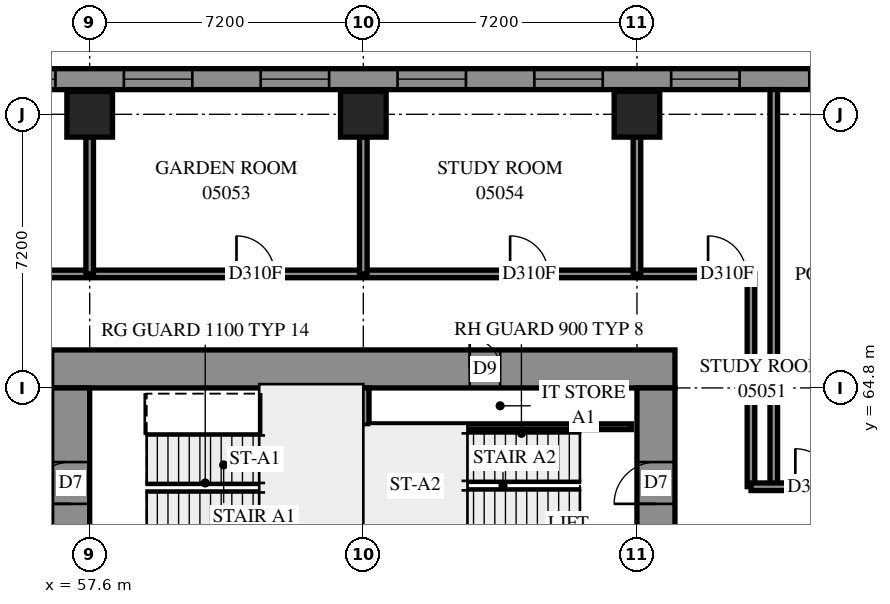
"""IFC4 building model, lengths in metres.
Left out: names, types, materials, properties, quantities, classifications, styles, units other than length and angle.
Written with IfcOpenShell. Run it as: python <this file> out.ifc"""

import sys

from ifc_helpers import new_model, si_unit, direction, frame, frame_2d, origin, origin_2d, place, context, subcontext, project, spatial, polyline, rectangle, outline, extrude, element, fill, save


model = new_model("IFC4")
c1 = context("Model", 3, precision=1e-05, world=origin(), true_north=direction((0.0, 1.0)))
c2 = subcontext(c1, "Body", "Model", "MODEL_VIEW")
j1 = project(units=[si_unit("LENGTHUNIT", "METRE"), si_unit("PLANEANGLEUNIT", "RADIAN")], contexts=[c1])
p1 = place(None, origin())
s1 = spatial("IfcSite", under=j1, at=p1, CompositionType="ELEMENT")
p2 = place(p1, origin())
s2 = spatial("IfcBuilding", under=s1, at=p2, CompositionType="ELEMENT")
p3 = place(p2, frame((0.0, 0.0, 22.8)))
s3 = spatial("IfcBuildingStorey", under=s2, at=p3, CompositionType="ELEMENT", Elevation=22.8)
for number, where, z_axis, x_axis in (
    (1, (57.6, 72.0, 0.0), (0.0, 0.0, 1.0), (1.0, 0.0, 0.0)),
    (2, (64.8, 72.0, 0.0), (0.0, 0.0, 1.0), (1.0, 0.0, 0.0)),
    (3, (72.0, 72.0, 0.0), (0.0, 0.0, 1.0), (1.0, 0.0, 0.0)),
):
    element("IfcColumn", number, at=place(p3, frame(where, z_axis=z_axis, x_axis=x_axis)), inside=s3, PredefinedType="COLUMN", context=c2, shape_type="SweptSolid", body=[
        extrude(rectangle(XDim=1.2, YDim=1.2, at=origin_2d()), origin(), (0.0, 0.0, 1.0), 3.9),
    ])
p4 = place(p3, frame((56.6, 65.3, -0.4), z_axis=(0.0, 0.0, 1.0), x_axis=(1.0, 0.0, 0.0)))
e4 = element("IfcWall", 4, at=p4, inside=s3, PredefinedType="SHEAR", context=c2, shape_type="SweptSolid", body=[
    extrude(rectangle(XDim=16.4, YDim=1.0, at=frame_2d((8.2, 0.0))), origin(), (0.0, 0.0, 1.0), 3.6),
])
p5 = place(p4, frame((11.0, 0.0, 0.4)))
e5 = element("IfcOpeningElement", 5, at=p5, cuts=e4, PredefinedType="OPENING", context=c2, shape_type="SweptSolid", body=[
    extrude(rectangle(XDim=0.8, YDim=2.1, at=frame_2d((0.4, 1.05))), frame((0.0, 0.51, 0.0), z_axis=(0.0, -1.0, 0.0), x_axis=(1.0, 0.0, 0.0)), (0.0, 0.0, 1.0), 1.02),
])
p6 = place(p3, frame((57.1, 50.4, -0.4), z_axis=(0.0, 0.0, 1.0), x_axis=(0.0, 1.0, 0.0)))
e6 = element("IfcWall", 6, at=p6, inside=s3, PredefinedType="SHEAR", context=c2, shape_type="SweptSolid", body=[
    extrude(rectangle(XDim=14.4, YDim=1.0, at=frame_2d((7.2, 0.0))), origin(), (0.0, 0.0, 1.0), 3.6),
])
p7 = place(p6, frame((4.55, 0.0, 0.4)))
e7 = element("IfcOpeningElement", 7, at=p7, cuts=e6, PredefinedType="OPENING", context=c2, shape_type="SweptSolid", body=[
    extrude(rectangle(XDim=1.1, YDim=2.1, at=frame_2d((0.55, 1.05))), frame((0.0, 0.51, 0.0), z_axis=(0.0, -1.0, 0.0), x_axis=(1.0, 0.0, 0.0)), (0.0, 0.0, 1.0), 1.02),
])
p8 = place(p6, frame((11.35, 0.0, 0.4)))
e8 = element("IfcOpeningElement", 8, at=p8, cuts=e6, PredefinedType="OPENING", context=c2, shape_type="SweptSolid", body=[
    extrude(rectangle(XDim=1.1, YDim=2.1, at=frame_2d((0.55, 1.05))), frame((0.0, 0.51, 0.0), z_axis=(0.0, -1.0, 0.0), x_axis=(1.0, 0.0, 0.0)), (0.0, 0.0, 1.0), 1.02),
])
p9 = place(p3, frame((72.5, 50.4, -0.4), z_axis=(0.0, 0.0, 1.0), x_axis=(0.0, 1.0, 0.0)))
e9 = element("IfcWall", 9, at=p9, inside=s3, PredefinedType="SHEAR", context=c2, shape_type="SweptSolid", body=[
    extrude(rectangle(XDim=14.4, YDim=1.0, at=frame_2d((7.2, 0.0))), origin(), (0.0, 0.0, 1.0), 3.6),
])
p10 = place(p9, frame((4.55, 0.0, 0.4)))
e10 = element("IfcOpeningElement", 10, at=p10, cuts=e9, PredefinedType="OPENING", context=c2, shape_type="SweptSolid", body=[
    extrude(rectangle(XDim=1.1, YDim=2.1, at=frame_2d((0.55, 1.05))), frame((0.0, 0.51, 0.0), z_axis=(0.0, -1.0, 0.0), x_axis=(1.0, 0.0, 0.0)), (0.0, 0.0, 1.0), 1.02),
])
p11 = place(p9, frame((11.35, 0.0, 0.4)))
e11 = element("IfcOpeningElement", 11, at=p11, cuts=e9, PredefinedType="OPENING", context=c2, shape_type="SweptSolid", body=[
    extrude(rectangle(XDim=1.1, YDim=2.1, at=frame_2d((0.55, 1.05))), frame((0.0, 0.51, 0.0), z_axis=(0.0, -1.0, 0.0), x_axis=(1.0, 0.0, 0.0)), (0.0, 0.0, 1.0), 1.02),
])
p12 = place(p3, frame((64.8, 60.6, 0.0), z_axis=(0.0, 0.0, 1.0), x_axis=(0.0, 1.0, 0.0)))
e12 = element("IfcWall", 12, at=p12, inside=s3, PredefinedType="SOLIDWALL", context=c2, shape_type="SweptSolid", body=[
    extrude(rectangle(XDim=4.2, YDim=0.3, at=frame_2d((2.1, 0.0))), origin(), (0.0, 0.0, 1.0), 3.9),
])
p13 = place(p3, frame((79.583, 72.925, 0.0), z_axis=(0.0, 0.0, 1.0), x_axis=(-1.0, 0.0, 0.0)))
e13 = element("IfcWall", 13, at=p13, inside=s3, PredefinedType="SOLIDWALL", context=c2, shape_type="SweptSolid", body=[
    extrude(outline(polyline([(-0.114, -0.275), (79.583, -0.275), (79.033, 0.275), (0.114, 0.275), (-0.114, -0.275)])), origin(), (0.0, 0.0, 1.0), 3.9),
])
p14 = place(p13, frame((1.249, 0.0, 0.7)))
e14 = element("IfcOpeningElement", 14, at=p14, cuts=e13, PredefinedType="OPENING", context=c2, shape_type="SweptSolid", body=[
    extrude(rectangle(XDim=1.8, YDim=2.4, at=frame_2d((0.9, 1.2))), frame((0.0, 0.285, 0.0), z_axis=(0.0, -1.0, 0.0), x_axis=(1.0, 0.0, 0.0)), (0.0, 0.0, 1.0), 0.57),
])
p15 = place(p13, frame((4.883, 0.0, 0.7)))
e15 = element("IfcOpeningElement", 15, at=p15, cuts=e13, PredefinedType="OPENING", context=c2, shape_type="SweptSolid", body=[
    extrude(rectangle(XDim=1.8, YDim=2.4, at=frame_2d((0.9, 1.2))), frame((0.0, 0.285, 0.0), z_axis=(0.0, -1.0, 0.0), x_axis=(1.0, 0.0, 0.0)), (0.0, 0.0, 1.0), 0.57),
])
p16 = place(p13, frame((8.483, 0.0, 0.7)))
e16 = element("IfcOpeningElement", 16, at=p16, cuts=e13, PredefinedType="OPENING", context=c2, shape_type="SweptSolid", body=[
    extrude(rectangle(XDim=1.8, YDim=2.4, at=frame_2d((0.9, 1.2))), frame((0.0, 0.285, 0.0), z_axis=(0.0, -1.0, 0.0), x_axis=(1.0, 0.0, 0.0)), (0.0, 0.0, 1.0), 0.57),
])
p17 = place(p13, frame((12.083, 0.0, 0.7)))
e17 = element("IfcOpeningElement", 17, at=p17, cuts=e13, PredefinedType="OPENING", context=c2, shape_type="SweptSolid", body=[
    extrude(rectangle(XDim=1.8, YDim=2.4, at=frame_2d((0.9, 1.2))), frame((0.0, 0.285, 0.0), z_axis=(0.0, -1.0, 0.0), x_axis=(1.0, 0.0, 0.0)), (0.0, 0.0, 1.0), 0.57),
])
p18 = place(p13, frame((15.683, 0.0, 0.7)))
e18 = element("IfcOpeningElement", 18, at=p18, cuts=e13, PredefinedType="OPENING", context=c2, shape_type="SweptSolid", body=[
    extrude(rectangle(XDim=1.8, YDim=2.4, at=frame_2d((0.9, 1.2))), frame((0.0, 0.285, 0.0), z_axis=(0.0, -1.0, 0.0), x_axis=(1.0, 0.0, 0.0)), (0.0, 0.0, 1.0), 0.57),
])
p19 = place(p13, frame((19.283, 0.0, 0.7)))
e19 = element("IfcOpeningElement", 19, at=p19, cuts=e13, PredefinedType="OPENING", context=c2, shape_type="SweptSolid", body=[
    extrude(rectangle(XDim=1.8, YDim=2.4, at=frame_2d((0.9, 1.2))), frame((0.0, 0.285, 0.0), z_axis=(0.0, -1.0, 0.0), x_axis=(1.0, 0.0, 0.0)), (0.0, 0.0, 1.0), 0.57),
])
p20 = place(p13, frame((22.883, 0.0, 0.7)))
e20 = element("IfcOpeningElement", 20, at=p20, cuts=e13, PredefinedType="OPENING", context=c2, shape_type="SweptSolid", body=[
    extrude(rectangle(XDim=1.8, YDim=2.4, at=frame_2d((0.9, 1.2))), frame((0.0, 0.285, 0.0), z_axis=(0.0, -1.0, 0.0), x_axis=(1.0, 0.0, 0.0)), (0.0, 0.0, 1.0), 0.57),
])
p21 = place(p13, frame((26.483, 0.0, 0.7)))
e21 = element("IfcOpeningElement", 21, at=p21, cuts=e13, PredefinedType="OPENING", context=c2, shape_type="SweptSolid", body=[
    extrude(rectangle(XDim=1.8, YDim=2.4, at=frame_2d((0.9, 1.2))), frame((0.0, 0.285, 0.0), z_axis=(0.0, -1.0, 0.0), x_axis=(1.0, 0.0, 0.0)), (0.0, 0.0, 1.0), 0.57),
])
p22 = place(p13, frame((30.083, 0.0, 0.7)))
e22 = element("IfcOpeningElement", 22, at=p22, cuts=e13, PredefinedType="OPENING", context=c2, shape_type="SweptSolid", body=[
    extrude(rectangle(XDim=1.8, YDim=2.4, at=frame_2d((0.9, 1.2))), frame((0.0, 0.285, 0.0), z_axis=(0.0, -1.0, 0.0), x_axis=(1.0, 0.0, 0.0)), (0.0, 0.0, 1.0), 0.57),
])
p23 = place(p13, frame((33.683, 0.0, 0.7)))
e23 = element("IfcOpeningElement", 23, at=p23, cuts=e13, PredefinedType="OPENING", context=c2, shape_type="SweptSolid", body=[
    extrude(rectangle(XDim=1.8, YDim=2.4, at=frame_2d((0.9, 1.2))), frame((0.0, 0.285, 0.0), z_axis=(0.0, -1.0, 0.0), x_axis=(1.0, 0.0, 0.0)), (0.0, 0.0, 1.0), 0.57),
])
p24 = place(p13, frame((37.283, 0.0, 0.7)))
e24 = element("IfcOpeningElement", 24, at=p24, cuts=e13, PredefinedType="OPENING", context=c2, shape_type="SweptSolid", body=[
    extrude(rectangle(XDim=1.8, YDim=2.4, at=frame_2d((0.9, 1.2))), frame((0.0, 0.285, 0.0), z_axis=(0.0, -1.0, 0.0), x_axis=(1.0, 0.0, 0.0)), (0.0, 0.0, 1.0), 0.57),
])
p25 = place(p13, frame((40.883, 0.0, 0.7)))
e25 = element("IfcOpeningElement", 25, at=p25, cuts=e13, PredefinedType="OPENING", context=c2, shape_type="SweptSolid", body=[
    extrude(rectangle(XDim=1.8, YDim=2.4, at=frame_2d((0.9, 1.2))), frame((0.0, 0.285, 0.0), z_axis=(0.0, -1.0, 0.0), x_axis=(1.0, 0.0, 0.0)), (0.0, 0.0, 1.0), 0.57),
])
p26 = place(p13, frame((44.483, 0.0, 0.7)))
e26 = element("IfcOpeningElement", 26, at=p26, cuts=e13, PredefinedType="OPENING", context=c2, shape_type="SweptSolid", body=[
    extrude(rectangle(XDim=1.8, YDim=2.4, at=frame_2d((0.9, 1.2))), frame((0.0, 0.285, 0.0), z_axis=(0.0, -1.0, 0.0), x_axis=(1.0, 0.0, 0.0)), (0.0, 0.0, 1.0), 0.57),
])
p27 = place(p13, frame((48.083, 0.0, 0.7)))
e27 = element("IfcOpeningElement", 27, at=p27, cuts=e13, PredefinedType="OPENING", context=c2, shape_type="SweptSolid", body=[
    extrude(rectangle(XDim=1.8, YDim=2.4, at=frame_2d((0.9, 1.2))), frame((0.0, 0.285, 0.0), z_axis=(0.0, -1.0, 0.0), x_axis=(1.0, 0.0, 0.0)), (0.0, 0.0, 1.0), 0.57),
])
p28 = place(p13, frame((51.683, 0.0, 0.7)))
e28 = element("IfcOpeningElement", 28, at=p28, cuts=e13, PredefinedType="OPENING", context=c2, shape_type="SweptSolid", body=[
    extrude(rectangle(XDim=1.8, YDim=2.4, at=frame_2d((0.9, 1.2))), frame((0.0, 0.285, 0.0), z_axis=(0.0, -1.0, 0.0), x_axis=(1.0, 0.0, 0.0)), (0.0, 0.0, 1.0), 0.57),
])
p29 = place(p13, frame((55.283, 0.0, 0.7)))
e29 = element("IfcOpeningElement", 29, at=p29, cuts=e13, PredefinedType="OPENING", context=c2, shape_type="SweptSolid", body=[
    extrude(rectangle(XDim=1.8, YDim=2.4, at=frame_2d((0.9, 1.2))), frame((0.0, 0.285, 0.0), z_axis=(0.0, -1.0, 0.0), x_axis=(1.0, 0.0, 0.0)), (0.0, 0.0, 1.0), 0.57),
])
p30 = place(p13, frame((58.883, 0.0, 0.7)))
e30 = element("IfcOpeningElement", 30, at=p30, cuts=e13, PredefinedType="OPENING", context=c2, shape_type="SweptSolid", body=[
    extrude(rectangle(XDim=1.8, YDim=2.4, at=frame_2d((0.9, 1.2))), frame((0.0, 0.285, 0.0), z_axis=(0.0, -1.0, 0.0), x_axis=(1.0, 0.0, 0.0)), (0.0, 0.0, 1.0), 0.57),
])
p31 = place(p13, frame((62.483, 0.0, 0.7)))
e31 = element("IfcOpeningElement", 31, at=p31, cuts=e13, PredefinedType="OPENING", context=c2, shape_type="SweptSolid", body=[
    extrude(rectangle(XDim=1.8, YDim=2.4, at=frame_2d((0.9, 1.2))), frame((0.0, 0.285, 0.0), z_axis=(0.0, -1.0, 0.0), x_axis=(1.0, 0.0, 0.0)), (0.0, 0.0, 1.0), 0.57),
])
p32 = place(p13, frame((66.083, 0.0, 0.7)))
e32 = element("IfcOpeningElement", 32, at=p32, cuts=e13, PredefinedType="OPENING", context=c2, shape_type="SweptSolid", body=[
    extrude(rectangle(XDim=1.8, YDim=2.4, at=frame_2d((0.9, 1.2))), frame((0.0, 0.285, 0.0), z_axis=(0.0, -1.0, 0.0), x_axis=(1.0, 0.0, 0.0)), (0.0, 0.0, 1.0), 0.57),
])
p33 = place(p13, frame((69.683, 0.0, 0.7)))
e33 = element("IfcOpeningElement", 33, at=p33, cuts=e13, PredefinedType="OPENING", context=c2, shape_type="SweptSolid", body=[
    extrude(rectangle(XDim=1.8, YDim=2.4, at=frame_2d((0.9, 1.2))), frame((0.0, 0.285, 0.0), z_axis=(0.0, -1.0, 0.0), x_axis=(1.0, 0.0, 0.0)), (0.0, 0.0, 1.0), 0.57),
])
p34 = place(p13, frame((73.683, 0.0, 0.7)))
e34 = element("IfcOpeningElement", 34, at=p34, cuts=e13, PredefinedType="OPENING", context=c2, shape_type="SweptSolid", body=[
    extrude(rectangle(XDim=1.8, YDim=2.4, at=frame_2d((0.9, 1.2))), frame((0.0, 0.285, 0.0), z_axis=(0.0, -1.0, 0.0), x_axis=(1.0, 0.0, 0.0)), (0.0, 0.0, 1.0), 0.57),
])
p35 = place(p13, frame((76.508, 0.0, 0.7)))
e35 = element("IfcOpeningElement", 35, at=p35, cuts=e13, PredefinedType="OPENING", context=c2, shape_type="SweptSolid", body=[
    extrude(rectangle(XDim=1.8, YDim=2.4, at=frame_2d((0.9, 1.2))), frame((0.0, 0.285, 0.0), z_axis=(0.0, -1.0, 0.0), x_axis=(1.0, 0.0, 0.0)), (0.0, 0.0, 1.0), 0.57),
])
p36 = place(p3, frame((64.95, 63.78, 0.0), z_axis=(0.0, 0.0, 1.0), x_axis=(1.0, 0.0, 0.0)))
e36 = element("IfcWall", 36, at=p36, inside=s3, PredefinedType="PARTITIONING", context=c2, shape_type="SweptSolid", body=[
    extrude(rectangle(XDim=6.9, YDim=0.15, at=frame_2d((3.45, 0.0))), origin(), (0.0, 0.0, 1.0), 3.9),
])
p37 = place(p3, frame((54.6, 67.8, 0.0), z_axis=(0.0, 0.0, 1.0), x_axis=(1.0, 0.0, 0.0)))
e37 = element("IfcWall", 37, at=p37, inside=s3, PredefinedType="PARTITIONING", context=c2, shape_type="SweptSolid", body=[
    extrude(rectangle(XDim=20.4, YDim=0.2, at=frame_2d((10.2, 0.0))), origin(), (0.0, 0.0, 1.0), 3.9),
])
p38 = place(p37, frame((19.271, 0.0, 0.0)))
e38 = element("IfcOpeningElement", 38, at=p38, cuts=e37, PredefinedType="OPENING", context=c2, shape_type="SweptSolid", body=[
    extrude(rectangle(XDim=1.0, YDim=2.1, at=frame_2d((0.5, 1.05))), frame((0.0, 0.11, 0.0), z_axis=(0.0, -1.0, 0.0), x_axis=(1.0, 0.0, 0.0)), (0.0, 0.0, 1.0), 0.22),
])
p39 = place(p37, frame((6.862, 0.0, 0.0)))
e39 = element("IfcOpeningElement", 39, at=p39, cuts=e37, PredefinedType="OPENING", context=c2, shape_type="SweptSolid", body=[
    extrude(rectangle(XDim=1.0, YDim=2.1, at=frame_2d((0.5, 1.05))), frame((0.0, 0.11, 0.0), z_axis=(0.0, -1.0, 0.0), x_axis=(1.0, 0.0, 0.0)), (0.0, 0.0, 1.0), 0.22),
])
p40 = place(p37, frame((14.062, 0.0, 0.0)))
e40 = element("IfcOpeningElement", 40, at=p40, cuts=e37, PredefinedType="OPENING", context=c2, shape_type="SweptSolid", body=[
    extrude(rectangle(XDim=1.0, YDim=2.1, at=frame_2d((0.5, 1.05))), frame((0.0, 0.11, 0.0), z_axis=(0.0, -1.0, 0.0), x_axis=(1.0, 0.0, 0.0)), (0.0, 0.0, 1.0), 0.22),
])
p41 = place(p3, frame((75.6, 62.2, 0.0), z_axis=(0.0, 0.0, 1.0), x_axis=(0.0, 1.0, 0.0)))
e41 = element("IfcWall", 41, at=p41, inside=s3, PredefinedType="PARTITIONING", context=c2, shape_type="SweptSolid", body=[
    extrude(rectangle(XDim=10.45, YDim=0.2, at=frame_2d((5.225, 0.0))), origin(), (0.0, 0.0, 1.0), 3.9),
])
p42 = place(p3, frame((75.0, 62.202, 0.0), z_axis=(0.0, 0.0, 1.0), x_axis=(0.0, 1.0, 0.0)))
e42 = element("IfcWall", 42, at=p42, inside=s3, PredefinedType="PARTITIONING", context=c2, shape_type="SweptSolid", body=[
    extrude(rectangle(XDim=5.598, YDim=0.2, at=frame_2d((2.799, 0.0))), origin(), (0.0, 0.0, 1.0), 3.9),
])
p43 = place(p3, frame((75.002, 62.2, 0.0), z_axis=(0.0, 0.0, 1.0), x_axis=(1.0, 0.0, 0.0)))
e43 = element("IfcWall", 43, at=p43, inside=s3, PredefinedType="PARTITIONING", context=c2, shape_type="SweptSolid", body=[
    extrude(rectangle(XDim=4.198, YDim=0.2, at=frame_2d((2.099, 0.0))), origin(), (0.0, 0.0, 1.0), 3.9),
])
p44 = place(p43, frame((1.165, 0.0, 0.0)))
e44 = element("IfcOpeningElement", 44, at=p44, cuts=e43, PredefinedType="OPENING", context=c2, shape_type="SweptSolid", body=[
    extrude(rectangle(XDim=1.0, YDim=2.1, at=frame_2d((0.5, 1.05))), frame((0.0, 0.11, 0.0), z_axis=(0.0, -1.0, 0.0), x_axis=(1.0, 0.0, 0.0)), (0.0, 0.0, 1.0), 0.22),
])
for number, where, z_axis, x_axis in (
    (45, (57.6, 67.8, 0.0), (0.0, 0.0, 1.0), (0.0, 1.0, 0.0)),
    (46, (64.8, 67.8, 0.0), (0.0, 0.0, 1.0), (0.0, 1.0, 0.0)),
    (47, (72.0, 67.8, 0.0), (0.0, 0.0, 1.0), (0.0, 1.0, 0.0)),
):
    element("IfcWall", number, at=place(p3, frame(where, z_axis=z_axis, x_axis=x_axis)), inside=s3, PredefinedType="PARTITIONING", context=c2, shape_type="SweptSolid", body=[
        extrude(rectangle(XDim=3.6, YDim=0.2, at=frame_2d((1.8, 0.0))), origin(), (0.0, 0.0, 1.0), 3.9),
    ])
p45 = place(p14, origin())
e48 = element("IfcWindow", 48, at=p45, inside=s3, PartitioningType="SINGLE_PANEL", PredefinedType="WINDOW", context=c2, shape_type="SweptSolid", body=[
    extrude(rectangle(XDim=1.8, YDim=2.4, at=frame_2d((0.9, 1.2))), frame((0.0, 0.155, 0.0), z_axis=(0.0, -1.0, 0.0), x_axis=(1.0, 0.0, 0.0)), (0.0, 0.0, 1.0), 0.06),
])
fill(e14, e48)
p46 = place(p15, origin())
e49 = element("IfcWindow", 49, at=p46, inside=s3, PartitioningType="SINGLE_PANEL", PredefinedType="WINDOW", context=c2, shape_type="SweptSolid", body=[
    extrude(rectangle(XDim=1.8, YDim=2.4, at=frame_2d((0.9, 1.2))), frame((0.0, 0.155, 0.0), z_axis=(0.0, -1.0, 0.0), x_axis=(1.0, 0.0, 0.0)), (0.0, 0.0, 1.0), 0.06),
])
fill(e15, e49)
p47 = place(p16, origin())
e50 = element("IfcWindow", 50, at=p47, inside=s3, PartitioningType="SINGLE_PANEL", PredefinedType="WINDOW", context=c2, shape_type="SweptSolid", body=[
    extrude(rectangle(XDim=1.8, YDim=2.4, at=frame_2d((0.9, 1.2))), frame((0.0, 0.155, 0.0), z_axis=(0.0, -1.0, 0.0), x_axis=(1.0, 0.0, 0.0)), (0.0, 0.0, 1.0), 0.06),
])
fill(e16, e50)
p48 = place(p17, origin())
e51 = element("IfcWindow", 51, at=p48, inside=s3, PartitioningType="SINGLE_PANEL", PredefinedType="WINDOW", context=c2, shape_type="SweptSolid", body=[
    extrude(rectangle(XDim=1.8, YDim=2.4, at=frame_2d((0.9, 1.2))), frame((0.0, 0.155, 0.0), z_axis=(0.0, -1.0, 0.0), x_axis=(1.0, 0.0, 0.0)), (0.0, 0.0, 1.0), 0.06),
])
fill(e17, e51)
p49 = place(p18, origin())
e52 = element("IfcWindow", 52, at=p49, inside=s3, PartitioningType="SINGLE_PANEL", PredefinedType="WINDOW", context=c2, shape_type="SweptSolid", body=[
    extrude(rectangle(XDim=1.8, YDim=2.4, at=frame_2d((0.9, 1.2))), frame((0.0, 0.155, 0.0), z_axis=(0.0, -1.0, 0.0), x_axis=(1.0, 0.0, 0.0)), (0.0, 0.0, 1.0), 0.06),
])
fill(e18, e52)
p50 = place(p19, origin())
e53 = element("IfcWindow", 53, at=p50, inside=s3, PartitioningType="SINGLE_PANEL", PredefinedType="WINDOW", context=c2, shape_type="SweptSolid", body=[
    extrude(rectangle(XDim=1.8, YDim=2.4, at=frame_2d((0.9, 1.2))), frame((0.0, 0.155, 0.0), z_axis=(0.0, -1.0, 0.0), x_axis=(1.0, 0.0, 0.0)), (0.0, 0.0, 1.0), 0.06),
])
fill(e19, e53)
p51 = place(p20, origin())
e54 = element("IfcWindow", 54, at=p51, inside=s3, PartitioningType="SINGLE_PANEL", PredefinedType="WINDOW", context=c2, shape_type="SweptSolid", body=[
    extrude(rectangle(XDim=1.8, YDim=2.4, at=frame_2d((0.9, 1.2))), frame((0.0, 0.155, 0.0), z_axis=(0.0, -1.0, 0.0), x_axis=(1.0, 0.0, 0.0)), (0.0, 0.0, 1.0), 0.06),
])
fill(e20, e54)
p52 = place(p5, origin())
e55 = element("IfcDoor", 55, at=p52, inside=s3, OperationType="SINGLE_SWING_RIGHT", PredefinedType="DOOR", context=c2, shape_type="SweptSolid", body=[
    extrude(rectangle(XDim=0.8, YDim=2.1, at=frame_2d((0.4, 1.05))), frame((0.0, -0.44, 0.0), z_axis=(0.0, -1.0, 0.0), x_axis=(1.0, 0.0, 0.0)), (0.0, 0.0, 1.0), 0.05),
])
fill(e5, e55)
p53 = place(p8, origin())
e56 = element("IfcDoor", 56, at=p53, inside=s3, OperationType="SINGLE_SWING_LEFT", PredefinedType="DOOR", context=c2, shape_type="SweptSolid", body=[
    extrude(rectangle(XDim=1.1, YDim=2.1, at=frame_2d((0.55, 1.05))), frame((0.0, 0.025, 0.0), z_axis=(0.0, -1.0, 0.0), x_axis=(1.0, 0.0, 0.0)), (0.0, 0.0, 1.0), 0.05),
])
fill(e8, e56)
p54 = place(p11, origin())
e57 = element("IfcDoor", 57, at=p54, inside=s3, OperationType="SINGLE_SWING_RIGHT", PredefinedType="DOOR", context=c2, shape_type="SweptSolid", body=[
    extrude(rectangle(XDim=1.1, YDim=2.1, at=frame_2d((0.55, 1.05))), frame((0.0, 0.025, 0.0), z_axis=(0.0, -1.0, 0.0), x_axis=(1.0, 0.0, 0.0)), (0.0, 0.0, 1.0), 0.05),
])
fill(e11, e57)
p55 = place(p38, origin())
e58 = element("IfcDoor", 58, at=p55, inside=s3, OperationType="SINGLE_SWING_RIGHT", PredefinedType="DOOR", context=c2, shape_type="SweptSolid", body=[
    extrude(rectangle(XDim=1.0, YDim=2.1, at=frame_2d((0.5, 1.05))), frame((0.0, 0.025, 0.0), z_axis=(0.0, -1.0, 0.0), x_axis=(1.0, 0.0, 0.0)), (0.0, 0.0, 1.0), 0.05),
])
fill(e38, e58)
p56 = place(p44, origin())
e59 = element("IfcDoor", 59, at=p56, inside=s3, OperationType="SINGLE_SWING_LEFT", PredefinedType="DOOR", context=c2, shape_type="SweptSolid", body=[
    extrude(rectangle(XDim=1.0, YDim=2.1, at=frame_2d((0.5, 1.05))), frame((0.0, 0.025, 0.0), z_axis=(0.0, -1.0, 0.0), x_axis=(1.0, 0.0, 0.0)), (0.0, 0.0, 1.0), 0.05),
])
fill(e44, e59)
p57 = place(p39, origin())
e60 = element("IfcDoor", 60, at=p57, inside=s3, OperationType="SINGLE_SWING_RIGHT", PredefinedType="DOOR", context=c2, shape_type="SweptSolid", body=[
    extrude(rectangle(XDim=1.0, YDim=2.1, at=frame_2d((0.5, 1.05))), frame((0.0, 0.025, 0.0), z_axis=(0.0, -1.0, 0.0), x_axis=(1.0, 0.0, 0.0)), (0.0, 0.0, 1.0), 0.05),
])
fill(e39, e60)
p58 = place(p40, origin())
e61 = element("IfcDoor", 61, at=p58, inside=s3, OperationType="SINGLE_SWING_RIGHT", PredefinedType="DOOR", context=c2, shape_type="SweptSolid", body=[
    extrude(rectangle(XDim=1.0, YDim=2.1, at=frame_2d((0.5, 1.05))), frame((0.0, 0.025, 0.0), z_axis=(0.0, -1.0, 0.0), x_axis=(1.0, 0.0, 0.0)), (0.0, 0.0, 1.0), 0.05),
])
fill(e40, e61)
save(model, sys.argv[1])
